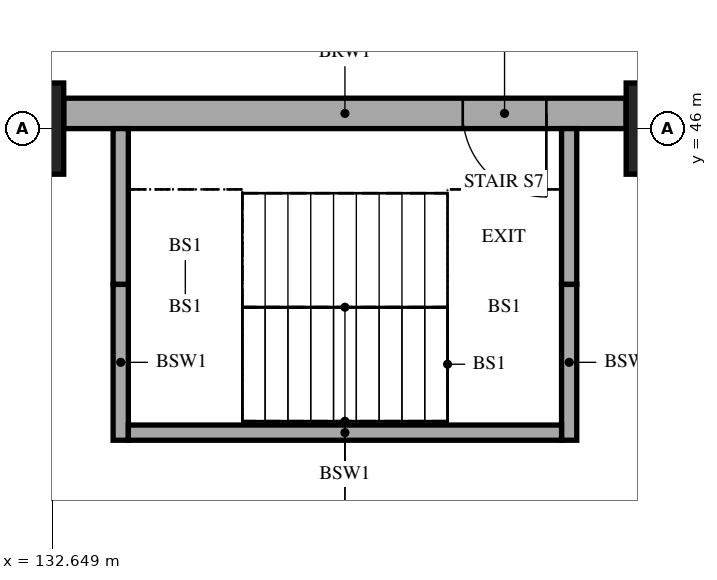
"""IFC4 building model, lengths in metres.
Left out: names, types, materials, properties, quantities, classifications, styles, units other than length and angle.
Written with IfcOpenShell. Run it as: python <this file> out.ifc"""

import sys

from ifc_helpers import new_model, si_unit, direction, frame, frame_2d, origin, origin_2d, place, context, subcontext, project, spatial, rectangle, extrude, element, fill, save


model = new_model("IFC4")
c1 = context("Model", 3, precision=1e-05, world=origin(), true_north=direction((0.0, 1.0)))
c2 = subcontext(c1, "Body", "Model", "MODEL_VIEW")
j1 = project(units=[si_unit("LENGTHUNIT", "METRE"), si_unit("PLANEANGLEUNIT", "RADIAN")], contexts=[c1])
p1 = place(None, origin())
s1 = spatial("IfcSite", under=j1, at=p1, CompositionType="ELEMENT")
p2 = place(p1, origin())
s2 = spatial("IfcBuilding", under=s1, at=p2, CompositionType="ELEMENT")
p3 = place(p2, frame((0.0, 0.0, -4.2)))
s3 = spatial("IfcBuildingStorey", under=s2, at=p3, CompositionType="ELEMENT", Elevation=-4.2)
for number, where, z_axis, x_axis in (
    (1, (132.0, 46.0, 0.0), (0.0, 0.0, 1.0), (1.0, 0.0, 0.0)),
    (2, (141.0, 46.0, 0.0), (0.0, 0.0, 1.0), (1.0, 0.0, 0.0)),
):
    element("IfcColumn", number, at=place(p3, frame(where, z_axis=z_axis, x_axis=x_axis)), inside=s3, PredefinedType="COLUMN", context=c2, shape_type="SweptSolid", body=[
        extrude(rectangle(XDim=1.6, YDim=1.2, at=origin_2d()), origin(), (0.0, 0.0, 1.0), 4.2),
    ])
p4 = place(p3, frame((132.8, 46.2, 0.0), z_axis=(0.0, 0.0, 1.0), x_axis=(1.0, 0.0, 0.0)))
e3 = element("IfcWall", 3, at=p4, inside=s3, PredefinedType="SOLIDWALL", context=c2, shape_type="SweptSolid", body=[
    extrude(rectangle(XDim=7.4, YDim=0.4, at=frame_2d((3.7, 0.0))), origin(), (0.0, 0.0, 1.0), 4.2),
])
p5 = place(p4, frame((5.25, 0.0, 0.0)))
e4 = element("IfcOpeningElement", 4, at=p5, cuts=e3, PredefinedType="OPENING", context=c2, shape_type="SweptSolid", body=[
    extrude(rectangle(XDim=1.1, YDim=2.1, at=frame_2d((0.55, 1.05))), frame((0.0, 0.21, 0.0), z_axis=(0.0, -1.0, 0.0), x_axis=(1.0, 0.0, 0.0)), (0.0, 0.0, 1.0), 0.42),
])
for number, where, z_axis, x_axis in (
    (5, (133.55, 46.0, 0.0), (0.0, 0.0, 1.0), (0.0, -1.0, 0.0)),
    (6, (133.55, 43.95, 0.0), (0.0, 0.0, 1.0), (0.0, -1.0, 0.0)),
    (7, (139.45, 46.0, 0.0), (0.0, 0.0, 1.0), (0.0, -1.0, 0.0)),
    (8, (139.45, 43.95, 0.0), (0.0, 0.0, 1.0), (0.0, -1.0, 0.0)),
):
    element("IfcWall", number, at=place(p3, frame(where, z_axis=z_axis, x_axis=x_axis)), inside=s3, PredefinedType="SOLIDWALL", context=c2, shape_type="SweptSolid", body=[
        extrude(rectangle(XDim=2.05, YDim=0.2, at=frame_2d((1.025, 0.0))), origin(), (0.0, 0.0, 1.0), 4.2),
    ])
p6 = place(p3, frame((133.65, 42.0, 0.0), z_axis=(0.0, 0.0, 1.0), x_axis=(1.0, 0.0, 0.0)))
e9 = element("IfcWall", 9, at=p6, inside=s3, PredefinedType="SOLIDWALL", context=c2, shape_type="SweptSolid", body=[
    extrude(rectangle(XDim=5.7, YDim=0.2, at=frame_2d((2.85, 0.0))), origin(), (0.0, 0.0, 1.0), 4.2),
])
p7 = place(p5, frame((1.1, 0.0, 0.0), z_axis=(0.0, 0.0, 1.0), x_axis=(-1.0, 0.0, 0.0)))
e10 = element("IfcDoor", 10, at=p7, inside=s3, OperationType="SINGLE_SWING_LEFT", PredefinedType="DOOR", context=c2, shape_type="SweptSolid", body=[
    extrude(rectangle(XDim=1.1, YDim=2.1, at=frame_2d((0.55, 1.05))), frame((0.0, 0.025, 0.0), z_axis=(0.0, -1.0, 0.0), x_axis=(1.0, 0.0, 0.0)), (0.0, 0.0, 1.0), 0.05),
])
fill(e4, e10)
save(model, sys.argv[1])
